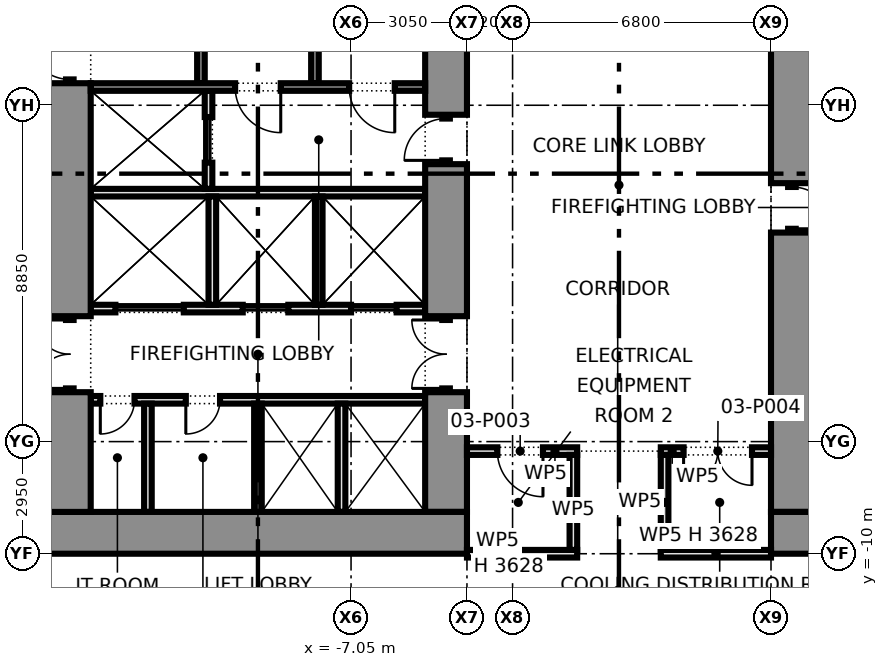
"""IFC4 building model, lengths in metres.
Left out: names, types, materials, properties, quantities, classifications, styles, units other than length and angle.
Written with IfcOpenShell. Run it as: python <this file> out.ifc"""

import sys

from ifc_helpers import new_model, si_unit, direction, frame, frame_2d, origin, place, context, subcontext, project, spatial, rectangle, extrude, element, fill, save


model = new_model("IFC4")
c1 = context("Model", 3, precision=1e-05, world=origin(), true_north=direction((0.0, 1.0)))
c2 = subcontext(c1, "Body", "Model", "MODEL_VIEW")
j1 = project(units=[si_unit("LENGTHUNIT", "METRE"), si_unit("PLANEANGLEUNIT", "RADIAN")], contexts=[c1])
p1 = place(None, origin())
s1 = spatial("IfcSite", under=j1, at=p1, CompositionType="ELEMENT")
p2 = place(p1, origin())
s2 = spatial("IfcBuilding", under=s1, at=p2, CompositionType="ELEMENT")
p3 = place(p2, frame((0.0, 0.0, 11.3)))
s3 = spatial("IfcBuildingStorey", under=s2, at=p3, CompositionType="ELEMENT", Elevation=11.3)
p4 = place(p3, frame((-15.0, -9.45, 0.0), z_axis=(0.0, 0.0, 1.0), x_axis=(1.0, 0.0, 0.0)))
e1 = element("IfcWall", 1, at=p4, inside=s3, PredefinedType="SHEAR", context=c2, shape_type="SweptSolid", body=[
    extrude(rectangle(XDim=11.0, YDim=1.1, at=frame_2d((5.5, 0.0))), origin(), (0.0, 0.0, 1.0), 4.575),
])
p5 = place(p3, frame((-14.45, -8.9, 0.0), z_axis=(0.0, 0.0, 1.0), x_axis=(0.0, 1.0, 0.0)))
e2 = element("IfcWall", 2, at=p5, inside=s3, PredefinedType="SHEAR", context=c2, shape_type="SweptSolid", body=[
    extrude(rectangle(XDim=3.15, YDim=1.1, at=frame_2d((1.575, 0.0))), origin(), (0.0, 0.0, 1.0), 4.575),
])
p6 = place(p3, frame((-14.45, -5.75, 0.0), z_axis=(0.0, 0.0, 1.0), x_axis=(0.0, 1.0, 0.0)))
e3 = element("IfcWall", 3, at=p6, inside=s3, PredefinedType="PARTITIONING", context=c2, shape_type="SweptSolid", body=[
    extrude(rectangle(XDim=2.0, YDim=0.2, at=frame_2d((1.0, 0.0))), origin(), (0.0, 0.0, 1.0), 2.4),
])
p7 = place(p6, frame((0.1, 0.0, 0.0)))
e4 = element("IfcOpeningElement", 4, at=p7, cuts=e3, PredefinedType="OPENING", context=c2, shape_type="SweptSolid", body=[
    extrude(rectangle(XDim=1.8, YDim=2.1, at=frame_2d((0.9, 1.05))), frame((0.0, 0.11, 0.0), z_axis=(0.0, -1.0, 0.0), x_axis=(1.0, 0.0, 0.0)), (0.0, 0.0, 1.0), 0.22),
])
p8 = place(p3, frame((-14.45, -3.75, 0.0), z_axis=(0.0, 0.0, 1.0), x_axis=(0.0, 1.0, 0.0)))
e5 = element("IfcWall", 5, at=p8, inside=s3, PredefinedType="SHEAR", context=c2, shape_type="SweptSolid", body=[
    extrude(rectangle(XDim=6.13, YDim=1.1, at=frame_2d((3.065, 0.0))), origin(), (0.0, 0.0, 1.0), 4.575),
])
p9 = place(p3, frame((-14.45, 2.38, 0.0), z_axis=(0.0, 0.0, 1.0), x_axis=(0.0, 1.0, 0.0)))
e6 = element("IfcWall", 6, at=p9, inside=s3, PredefinedType="SHEAR", context=c2, shape_type="SweptSolid", body=[
    extrude(rectangle(XDim=1.3, YDim=0.2, at=frame_2d((0.65, 0.0))), origin(), (0.0, 0.0, 1.0), 2.4),
])
p10 = place(p9, frame((0.1, 0.0, 0.0)))
e7 = element("IfcOpeningElement", 7, at=p10, cuts=e6, PredefinedType="OPENING", context=c2, shape_type="SweptSolid", body=[
    extrude(rectangle(XDim=1.1, YDim=2.1, at=frame_2d((0.55, 1.05))), frame((0.0, 0.11, 0.0), z_axis=(0.0, -1.0, 0.0), x_axis=(1.0, 0.0, 0.0)), (0.0, 0.0, 1.0), 0.22),
])
p11 = place(p3, frame((-4.55, -8.9, 0.0), z_axis=(0.0, 0.0, 1.0), x_axis=(0.0, 1.0, 0.0)))
e8 = element("IfcWall", 8, at=p11, inside=s3, PredefinedType="SHEAR", context=c2, shape_type="SweptSolid", body=[
    extrude(rectangle(XDim=3.15, YDim=1.1, at=frame_2d((1.575, 0.0))), origin(), (0.0, 0.0, 1.0), 4.575),
])
p12 = place(p3, frame((-4.55, -5.75, 0.0), z_axis=(0.0, 0.0, 1.0), x_axis=(0.0, 1.0, 0.0)))
e9 = element("IfcWall", 9, at=p12, inside=s3, PredefinedType="PARTITIONING", context=c2, shape_type="SweptSolid", body=[
    extrude(rectangle(XDim=2.0, YDim=0.2, at=frame_2d((1.0, 0.0))), origin(), (0.0, 0.0, 1.0), 2.4),
])
p13 = place(p12, frame((0.1, 0.0, 0.0)))
e10 = element("IfcOpeningElement", 10, at=p13, cuts=e9, PredefinedType="OPENING", context=c2, shape_type="SweptSolid", body=[
    extrude(rectangle(XDim=1.8, YDim=2.1, at=frame_2d((0.9, 1.05))), frame((0.0, 0.11, 0.0), z_axis=(0.0, -1.0, 0.0), x_axis=(1.0, 0.0, 0.0)), (0.0, 0.0, 1.0), 0.22),
])
p14 = place(p3, frame((-4.55, -3.75, 0.0), z_axis=(0.0, 0.0, 1.0), x_axis=(0.0, 1.0, 0.0)))
e11 = element("IfcWall", 11, at=p14, inside=s3, PredefinedType="SHEAR", context=c2, shape_type="SweptSolid", body=[
    extrude(rectangle(XDim=4.0, YDim=1.1, at=frame_2d((2.0, 0.0))), origin(), (0.0, 0.0, 1.0), 4.575),
])
p15 = place(p3, frame((-4.55, 0.25, 0.0), z_axis=(0.0, 0.0, 1.0), x_axis=(0.0, 1.0, 0.0)))
e12 = element("IfcWall", 12, at=p15, inside=s3, PredefinedType="PARTITIONING", context=c2, shape_type="SweptSolid", body=[
    extrude(rectangle(XDim=1.3, YDim=0.2, at=frame_2d((0.65, 0.0))), origin(), (0.0, 0.0, 1.0), 2.4),
])
p16 = place(p15, frame((0.1, 0.0, 0.0)))
e13 = element("IfcOpeningElement", 13, at=p16, cuts=e12, PredefinedType="OPENING", context=c2, shape_type="SweptSolid", body=[
    extrude(rectangle(XDim=1.1, YDim=2.1, at=frame_2d((0.55, 1.05))), frame((0.0, 0.11, 0.0), z_axis=(0.0, -1.0, 0.0), x_axis=(1.0, 0.0, 0.0)), (0.0, 0.0, 1.0), 0.22),
])
p17 = place(p3, frame((-4.55, 1.55, 0.0), z_axis=(0.0, 0.0, 1.0), x_axis=(0.0, 1.0, 0.0)))
e14 = element("IfcWall", 14, at=p17, inside=s3, PredefinedType="SHEAR", context=c2, shape_type="SweptSolid", body=[
    extrude(rectangle(XDim=7.35, YDim=1.1, at=frame_2d((3.675, 0.0))), origin(), (0.0, 0.0, 1.0), 4.575),
])
p18 = place(p3, frame((-13.9, -5.95, 0.0), z_axis=(0.0, 0.0, 1.0), x_axis=(1.0, 0.0, 0.0)))
e15 = element("IfcWall", 15, at=p18, inside=s3, PredefinedType="PARTITIONING", context=c2, shape_type="SweptSolid", body=[
    extrude(rectangle(XDim=8.8, YDim=0.2, at=frame_2d((4.4, 0.0))), origin(), (0.0, 0.0, 1.0), 4.575),
])
p19 = place(p18, frame((0.252, 0.0, 0.0)))
e16 = element("IfcOpeningElement", 16, at=p19, cuts=e15, PredefinedType="OPENING", context=c2, shape_type="SweptSolid", body=[
    extrude(rectangle(XDim=0.9, YDim=2.1, at=frame_2d((0.45, 1.05))), frame((0.0, 0.11, 0.0), z_axis=(0.0, -1.0, 0.0), x_axis=(1.0, 0.0, 0.0)), (0.0, 0.0, 1.0), 0.22),
])
p20 = place(p18, frame((2.502, 0.0, 0.0)))
e17 = element("IfcOpeningElement", 17, at=p20, cuts=e15, PredefinedType="OPENING", context=c2, shape_type="SweptSolid", body=[
    extrude(rectangle(XDim=0.9, YDim=2.1, at=frame_2d((0.45, 1.05))), frame((0.0, 0.11, 0.0), z_axis=(0.0, -1.0, 0.0), x_axis=(1.0, 0.0, 0.0)), (0.0, 0.0, 1.0), 0.22),
])
p21 = place(p3, frame((-13.9, -3.55, 0.0), z_axis=(0.0, 0.0, 1.0), x_axis=(1.0, 0.0, 0.0)))
e18 = element("IfcWall", 18, at=p21, inside=s3, PredefinedType="PARTITIONING", context=c2, shape_type="SweptSolid", body=[
    extrude(rectangle(XDim=8.8, YDim=0.2, at=frame_2d((4.4, 0.0))), origin(), (0.0, 0.0, 1.0), 4.575),
])
p22 = place(p21, frame((0.65, 0.0, 0.0)))
e19 = element("IfcOpeningElement", 19, at=p22, cuts=e18, PredefinedType="OPENING", context=c2, shape_type="SweptSolid", body=[
    extrude(rectangle(XDim=1.8, YDim=2.1, at=frame_2d((0.9, 1.05))), frame((0.0, 0.11, 0.0), z_axis=(0.0, -1.0, 0.0), x_axis=(1.0, 0.0, 0.0)), (0.0, 0.0, 1.0), 0.22),
])
p23 = place(p21, frame((4.0, 0.0, 0.0)))
e20 = element("IfcOpeningElement", 20, at=p23, cuts=e18, PredefinedType="OPENING", context=c2, shape_type="SweptSolid", body=[
    extrude(rectangle(XDim=1.2, YDim=2.1, at=frame_2d((0.6, 1.05))), frame((0.0, 0.11, 0.0), z_axis=(0.0, -1.0, 0.0), x_axis=(1.0, 0.0, 0.0)), (0.0, 0.0, 1.0), 0.22),
])
p24 = place(p21, frame((6.85, 0.0, 0.0)))
e21 = element("IfcOpeningElement", 21, at=p24, cuts=e18, PredefinedType="OPENING", context=c2, shape_type="SweptSolid", body=[
    extrude(rectangle(XDim=1.2, YDim=2.1, at=frame_2d((0.6, 1.05))), frame((0.0, 0.11, 0.0), z_axis=(0.0, -1.0, 0.0), x_axis=(1.0, 0.0, 0.0)), (0.0, 0.0, 1.0), 0.22),
])
p25 = place(p3, frame((-13.9, -0.5, 0.0), z_axis=(0.0, 0.0, 1.0), x_axis=(1.0, 0.0, 0.0)))
e22 = element("IfcWall", 22, at=p25, inside=s3, PredefinedType="PARTITIONING", context=c2, shape_type="SweptSolid", body=[
    extrude(rectangle(XDim=8.8, YDim=0.2, at=frame_2d((4.4, 0.0))), origin(), (0.0, 0.0, 1.0), 4.575),
])
p26 = place(p3, frame((-10.8, -0.4, 0.0), z_axis=(0.0, 0.0, 1.0), x_axis=(0.0, 1.0, 0.0)))
e23 = element("IfcWall", 23, at=p26, inside=s3, PredefinedType="PARTITIONING", context=c2, shape_type="SweptSolid", body=[
    extrude(rectangle(XDim=2.58, YDim=0.2, at=frame_2d((1.29, 0.0))), origin(), (0.0, 0.0, 1.0), 4.575),
])
p27 = place(p26, frame((0.69, 0.0, 0.0)))
e24 = element("IfcOpeningElement", 24, at=p27, cuts=e23, PredefinedType="OPENING", context=c2, shape_type="SweptSolid", body=[
    extrude(rectangle(XDim=1.2, YDim=2.1, at=frame_2d((0.6, 1.05))), frame((0.0, 0.11, 0.0), z_axis=(0.0, -1.0, 0.0), x_axis=(1.0, 0.0, 0.0)), (0.0, 0.0, 1.0), 0.22),
])
p28 = place(p3, frame((-13.9, 2.28, 0.0), z_axis=(0.0, 0.0, 1.0), x_axis=(1.0, 0.0, 0.0)))
e25 = element("IfcWall", 25, at=p28, inside=s3, PredefinedType="SHEAR", context=c2, shape_type="SweptSolid", body=[
    extrude(rectangle(XDim=8.8, YDim=0.2, at=frame_2d((4.4, 0.0))), origin(), (0.0, 0.0, 1.0), 4.575),
])
p29 = place(p28, frame((3.8, 0.0, 0.0)))
e26 = element("IfcOpeningElement", 26, at=p29, cuts=e25, PredefinedType="OPENING", context=c2, shape_type="SweptSolid", body=[
    extrude(rectangle(XDim=1.2, YDim=2.1, at=frame_2d((0.6, 1.05))), frame((0.0, 0.11, 0.0), z_axis=(0.0, -1.0, 0.0), x_axis=(1.0, 0.0, 0.0)), (0.0, 0.0, 1.0), 0.22),
])
p30 = place(p28, frame((6.8, 0.0, 0.0)))
e27 = element("IfcOpeningElement", 27, at=p30, cuts=e25, PredefinedType="OPENING", context=c2, shape_type="SweptSolid", body=[
    extrude(rectangle(XDim=1.2, YDim=2.1, at=frame_2d((0.6, 1.05))), frame((0.0, 0.11, 0.0), z_axis=(0.0, -1.0, 0.0), x_axis=(1.0, 0.0, 0.0)), (0.0, 0.0, 1.0), 0.22),
])
for number, where, z_axis, x_axis in (
    (28, (-11.0, 2.38, 0.0), (0.0, 0.0, 1.0), (0.0, 1.0, 0.0)),
    (29, (-8.0, 2.38, 0.0), (0.0, 0.0, 1.0), (0.0, 1.0, 0.0)),
):
    element("IfcWall", number, at=place(p3, frame(where, z_axis=z_axis, x_axis=x_axis)), inside=s3, PredefinedType="SHEAR", context=c2, shape_type="SweptSolid", body=[
        extrude(rectangle(XDim=6.52, YDim=0.2, at=frame_2d((3.26, 0.0))), origin(), (0.0, 0.0, 1.0), 4.575),
    ])
for number, where, z_axis, x_axis in (
    (30, (-9.5, -8.9, 0.0), (0.0, 0.0, 1.0), (0.0, 1.0, 0.0)),
    (31, (-7.3, -8.9, 0.0), (0.0, 0.0, 1.0), (0.0, 1.0, 0.0)),
    (32, (-12.395, -8.9, 0.0), (0.0, 0.0, 1.0), (0.0, 1.0, 0.0)),
    (33, (-10.7, -3.45, 0.0), (0.0, 0.0, 1.0), (0.0, 1.0, 0.0)),
    (34, (-7.9, -3.45, 0.0), (0.0, 0.0, 1.0), (0.0, 1.0, 0.0)),
):
    element("IfcWall", number, at=place(p3, frame(where, z_axis=z_axis, x_axis=x_axis)), inside=s3, PredefinedType="PARTITIONING", context=c2, shape_type="SweptSolid", body=[
        extrude(rectangle(XDim=2.85, YDim=0.2, at=frame_2d((1.425, 0.0))), origin(), (0.0, 0.0, 1.0), 4.575),
    ])
p31 = place(p3, frame((15.0, -9.45, 0.0), z_axis=(0.0, 0.0, 1.0), x_axis=(-1.0, 0.0, 0.0)))
e35 = element("IfcWall", 35, at=p31, inside=s3, PredefinedType="SHEAR", context=c2, shape_type="SweptSolid", body=[
    extrude(rectangle(XDim=11.0, YDim=1.1, at=frame_2d((5.5, 0.0))), origin(), (0.0, 0.0, 1.0), 4.575),
])
p32 = place(p3, frame((4.55, 3.75, 0.0), z_axis=(0.0, 0.0, 1.0), x_axis=(0.0, -1.0, 0.0)))
e36 = element("IfcWall", 36, at=p32, inside=s3, PredefinedType="SHEAR", context=c2, shape_type="SweptSolid", body=[
    extrude(rectangle(XDim=4.0, YDim=1.1, at=frame_2d((2.0, 0.0))), origin(), (0.0, 0.0, 1.0), 4.575),
])
p33 = place(p3, frame((4.55, -0.25, 0.0), z_axis=(0.0, 0.0, 1.0), x_axis=(0.0, -1.0, 0.0)))
e37 = element("IfcWall", 37, at=p33, inside=s3, PredefinedType="PARTITIONING", context=c2, shape_type="SweptSolid", body=[
    extrude(rectangle(XDim=1.3, YDim=0.2, at=frame_2d((0.65, 0.0))), origin(), (0.0, 0.0, 1.0), 2.4),
])
p34 = place(p33, frame((0.1, 0.0, 0.0)))
e38 = element("IfcOpeningElement", 38, at=p34, cuts=e37, PredefinedType="OPENING", context=c2, shape_type="SweptSolid", body=[
    extrude(rectangle(XDim=1.1, YDim=2.1, at=frame_2d((0.55, 1.05))), frame((0.0, 0.11, 0.0), z_axis=(0.0, -1.0, 0.0), x_axis=(1.0, 0.0, 0.0)), (0.0, 0.0, 1.0), 0.22),
])
p35 = place(p3, frame((4.55, -1.55, 0.0), z_axis=(0.0, 0.0, 1.0), x_axis=(0.0, -1.0, 0.0)))
e39 = element("IfcWall", 39, at=p35, inside=s3, PredefinedType="SHEAR", context=c2, shape_type="SweptSolid", body=[
    extrude(rectangle(XDim=7.35, YDim=1.1, at=frame_2d((3.675, 0.0))), origin(), (0.0, 0.0, 1.0), 4.575),
])
for number, where, z_axis, x_axis in (
    (40, (-4.0, -10.0, 0.0), (0.0, 0.0, 1.0), (1.0, 0.0, 0.0)),
    (41, (1.1, -10.0, 0.0), (0.0, 0.0, 1.0), (1.0, 0.0, 0.0)),
):
    element("IfcWall", number, at=place(p3, frame(where, z_axis=z_axis, x_axis=x_axis)), inside=s3, PredefinedType="PARTITIONING", context=c2, shape_type="SweptSolid", body=[
        extrude(rectangle(XDim=2.9, YDim=0.2, at=frame_2d((1.45, 0.0))), origin(), (0.0, 0.0, 1.0), 3.627),
    ])
p36 = place(p3, frame((-4.0, -7.3, 0.0), z_axis=(0.0, 0.0, 1.0), x_axis=(1.0, 0.0, 0.0)))
e42 = element("IfcWall", 42, at=p36, inside=s3, PredefinedType="PARTITIONING", context=c2, shape_type="SweptSolid", body=[
    extrude(rectangle(XDim=2.9, YDim=0.2, at=frame_2d((1.45, 0.0))), origin(), (0.0, 0.0, 1.0), 4.575),
])
p37 = place(p36, frame((0.8, 0.0, 0.0)))
e43 = element("IfcOpeningElement", 43, at=p37, cuts=e42, PredefinedType="OPENING", context=c2, shape_type="SweptSolid", body=[
    extrude(rectangle(XDim=1.2, YDim=2.1, at=frame_2d((0.6, 1.05))), frame((0.0, 0.11, 0.0), z_axis=(0.0, -1.0, 0.0), x_axis=(1.0, 0.0, 0.0)), (0.0, 0.0, 1.0), 0.22),
])
p38 = place(p3, frame((1.1, -7.3, 0.0), z_axis=(0.0, 0.0, 1.0), x_axis=(1.0, 0.0, 0.0)))
e44 = element("IfcWall", 44, at=p38, inside=s3, PredefinedType="PARTITIONING", context=c2, shape_type="SweptSolid", body=[
    extrude(rectangle(XDim=2.9, YDim=0.2, at=frame_2d((1.45, 0.0))), origin(), (0.0, 0.0, 1.0), 4.575),
])
p39 = place(p38, frame((0.6, 0.0, 0.0)))
e45 = element("IfcOpeningElement", 45, at=p39, cuts=e44, PredefinedType="OPENING", context=c2, shape_type="SweptSolid", body=[
    extrude(rectangle(XDim=1.8, YDim=2.1, at=frame_2d((0.9, 1.05))), frame((0.0, 0.11, 0.0), z_axis=(0.0, -1.0, 0.0), x_axis=(1.0, 0.0, 0.0)), (0.0, 0.0, 1.0), 0.22),
])
for number, where, z_axis, x_axis in (
    (46, (1.2, -9.9, 0.0), (0.0, 0.0, 1.0), (0.0, 1.0, 0.0)),
    (47, (-1.2, -9.9, 0.0), (0.0, 0.0, 1.0), (0.0, 1.0, 0.0)),
):
    element("IfcWall", number, at=place(p3, frame(where, z_axis=z_axis, x_axis=x_axis)), inside=s3, PredefinedType="PARTITIONING", context=c2, shape_type="SweptSolid", body=[
        extrude(rectangle(XDim=2.5, YDim=0.2, at=frame_2d((1.25, 0.0))), origin(), (0.0, 0.0, 1.0), 4.575),
    ])
p40 = place(p7, origin())
e48 = element("IfcDoor", 48, at=p40, inside=s3, OperationType="DOUBLE_DOOR_SINGLE_SWING", PredefinedType="DOOR", context=c2, shape_type="SweptSolid", body=[
    extrude(rectangle(XDim=1.8, YDim=2.1, at=frame_2d((0.9, 1.05))), frame((0.0, 0.025, 0.0), z_axis=(0.0, -1.0, 0.0), x_axis=(1.0, 0.0, 0.0)), (0.0, 0.0, 1.0), 0.05),
])
fill(e4, e48)
p41 = place(p10, origin())
e49 = element("IfcDoor", 49, at=p41, inside=s3, OperationType="SINGLE_SWING_RIGHT", PredefinedType="DOOR", context=c2, shape_type="SweptSolid", body=[
    extrude(rectangle(XDim=1.1, YDim=2.1, at=frame_2d((0.55, 1.05))), frame((0.0, 0.025, 0.0), z_axis=(0.0, -1.0, 0.0), x_axis=(1.0, 0.0, 0.0)), (0.0, 0.0, 1.0), 0.05),
])
fill(e7, e49)
p42 = place(p13, origin())
e50 = element("IfcDoor", 50, at=p42, inside=s3, OperationType="DOUBLE_DOOR_SINGLE_SWING", PredefinedType="DOOR", context=c2, shape_type="SweptSolid", body=[
    extrude(rectangle(XDim=1.8, YDim=2.1, at=frame_2d((0.9, 1.05))), frame((0.0, 0.025, 0.0), z_axis=(0.0, -1.0, 0.0), x_axis=(1.0, 0.0, 0.0)), (0.0, 0.0, 1.0), 0.05),
])
fill(e10, e50)
p43 = place(p16, origin())
e51 = element("IfcDoor", 51, at=p43, inside=s3, OperationType="SINGLE_SWING_LEFT", PredefinedType="DOOR", context=c2, shape_type="SweptSolid", body=[
    extrude(rectangle(XDim=1.1, YDim=2.1, at=frame_2d((0.55, 1.05))), frame((0.0, 0.025, 0.0), z_axis=(0.0, -1.0, 0.0), x_axis=(1.0, 0.0, 0.0)), (0.0, 0.0, 1.0), 0.05),
])
fill(e13, e51)
p44 = place(p22, origin())
e52 = element("IfcDoor", 52, at=p44, inside=s3, OperationType="DOUBLE_DOOR_SLIDING", PredefinedType="DOOR", context=c2, shape_type="SweptSolid", body=[
    extrude(rectangle(XDim=1.8, YDim=2.1, at=frame_2d((0.9, 1.05))), frame((0.0, 0.025, 0.0), z_axis=(0.0, -1.0, 0.0), x_axis=(1.0, 0.0, 0.0)), (0.0, 0.0, 1.0), 0.05),
])
fill(e19, e52)
p45 = place(p23, origin())
e53 = element("IfcDoor", 53, at=p45, inside=s3, OperationType="DOUBLE_DOOR_SLIDING", PredefinedType="DOOR", context=c2, shape_type="SweptSolid", body=[
    extrude(rectangle(XDim=1.2, YDim=2.1, at=frame_2d((0.6, 1.05))), frame((0.0, 0.025, 0.0), z_axis=(0.0, -1.0, 0.0), x_axis=(1.0, 0.0, 0.0)), (0.0, 0.0, 1.0), 0.05),
])
fill(e20, e53)
p46 = place(p24, origin())
e54 = element("IfcDoor", 54, at=p46, inside=s3, OperationType="DOUBLE_DOOR_SLIDING", PredefinedType="DOOR", context=c2, shape_type="SweptSolid", body=[
    extrude(rectangle(XDim=1.2, YDim=2.1, at=frame_2d((0.6, 1.05))), frame((0.0, 0.025, 0.0), z_axis=(0.0, -1.0, 0.0), x_axis=(1.0, 0.0, 0.0)), (0.0, 0.0, 1.0), 0.05),
])
fill(e21, e54)
p47 = place(p27, origin())
e55 = element("IfcDoor", 55, at=p47, inside=s3, OperationType="DOUBLE_DOOR_SLIDING", PredefinedType="DOOR", context=c2, shape_type="SweptSolid", body=[
    extrude(rectangle(XDim=1.2, YDim=2.1, at=frame_2d((0.6, 1.05))), frame((0.0, 0.025, 0.0), z_axis=(0.0, -1.0, 0.0), x_axis=(1.0, 0.0, 0.0)), (0.0, 0.0, 1.0), 0.05),
])
fill(e24, e55)
p48 = place(p19, frame((0.9, 0.0, 0.0), z_axis=(0.0, 0.0, 1.0), x_axis=(-1.0, 0.0, 0.0)))
e56 = element("IfcDoor", 56, at=p48, inside=s3, OperationType="SINGLE_SWING_RIGHT", PredefinedType="DOOR", context=c2, shape_type="SweptSolid", body=[
    extrude(rectangle(XDim=0.9, YDim=2.1, at=frame_2d((0.45, 1.05))), frame((0.0, 0.025, 0.0), z_axis=(0.0, -1.0, 0.0), x_axis=(1.0, 0.0, 0.0)), (0.0, 0.0, 1.0), 0.05),
])
fill(e16, e56)
p49 = place(p20, frame((0.9, 0.0, 0.0), z_axis=(0.0, 0.0, 1.0), x_axis=(-1.0, 0.0, 0.0)))
e57 = element("IfcDoor", 57, at=p49, inside=s3, OperationType="SINGLE_SWING_RIGHT", PredefinedType="DOOR", context=c2, shape_type="SweptSolid", body=[
    extrude(rectangle(XDim=0.9, YDim=2.1, at=frame_2d((0.45, 1.05))), frame((0.0, 0.025, 0.0), z_axis=(0.0, -1.0, 0.0), x_axis=(1.0, 0.0, 0.0)), (0.0, 0.0, 1.0), 0.05),
])
fill(e17, e57)
p50 = place(p29, frame((1.2, 0.0, 0.0), z_axis=(0.0, 0.0, 1.0), x_axis=(-1.0, 0.0, 0.0)))
e58 = element("IfcDoor", 58, at=p50, inside=s3, OperationType="SINGLE_SWING_LEFT", PredefinedType="DOOR", context=c2, shape_type="SweptSolid", body=[
    extrude(rectangle(XDim=1.2, YDim=2.1, at=frame_2d((0.6, 1.05))), frame((0.0, 0.025, 0.0), z_axis=(0.0, -1.0, 0.0), x_axis=(1.0, 0.0, 0.0)), (0.0, 0.0, 1.0), 0.05),
])
fill(e26, e58)
p51 = place(p30, frame((1.2, 0.0, 0.0), z_axis=(0.0, 0.0, 1.0), x_axis=(-1.0, 0.0, 0.0)))
e59 = element("IfcDoor", 59, at=p51, inside=s3, OperationType="SINGLE_SWING_LEFT", PredefinedType="DOOR", context=c2, shape_type="SweptSolid", body=[
    extrude(rectangle(XDim=1.2, YDim=2.1, at=frame_2d((0.6, 1.05))), frame((0.0, 0.025, 0.0), z_axis=(0.0, -1.0, 0.0), x_axis=(1.0, 0.0, 0.0)), (0.0, 0.0, 1.0), 0.05),
])
fill(e27, e59)
p52 = place(p34, origin())
e60 = element("IfcDoor", 60, at=p52, inside=s3, OperationType="SINGLE_SWING_RIGHT", PredefinedType="DOOR", context=c2, shape_type="SweptSolid", body=[
    extrude(rectangle(XDim=1.1, YDim=2.1, at=frame_2d((0.55, 1.05))), frame((0.0, 0.025, 0.0), z_axis=(0.0, -1.0, 0.0), x_axis=(1.0, 0.0, 0.0)), (0.0, 0.0, 1.0), 0.05),
])
fill(e38, e60)
p53 = place(p37, frame((1.2, 0.0, 0.0), z_axis=(0.0, 0.0, 1.0), x_axis=(-1.0, 0.0, 0.0)))
e61 = element("IfcDoor", 61, at=p53, inside=s3, OperationType="SINGLE_SWING_LEFT", PredefinedType="DOOR", context=c2, shape_type="SweptSolid", body=[
    extrude(rectangle(XDim=1.2, YDim=2.1, at=frame_2d((0.6, 1.05))), frame((0.0, 0.025, 0.0), z_axis=(0.0, -1.0, 0.0), x_axis=(1.0, 0.0, 0.0)), (0.0, 0.0, 1.0), 0.05),
])
fill(e43, e61)
p54 = place(p39, frame((1.8, 0.0, 0.0), z_axis=(0.0, 0.0, 1.0), x_axis=(-1.0, 0.0, 0.0)))
e62 = element("IfcDoor", 62, at=p54, inside=s3, OperationType="DOUBLE_DOOR_SINGLE_SWING", PredefinedType="DOOR", context=c2, shape_type="SweptSolid", body=[
    extrude(rectangle(XDim=1.8, YDim=2.1, at=frame_2d((0.9, 1.05))), frame((0.0, 0.025, 0.0), z_axis=(0.0, -1.0, 0.0), x_axis=(1.0, 0.0, 0.0)), (0.0, 0.0, 1.0), 0.05),
])
fill(e45, e62)
save(model, sys.argv[1])
